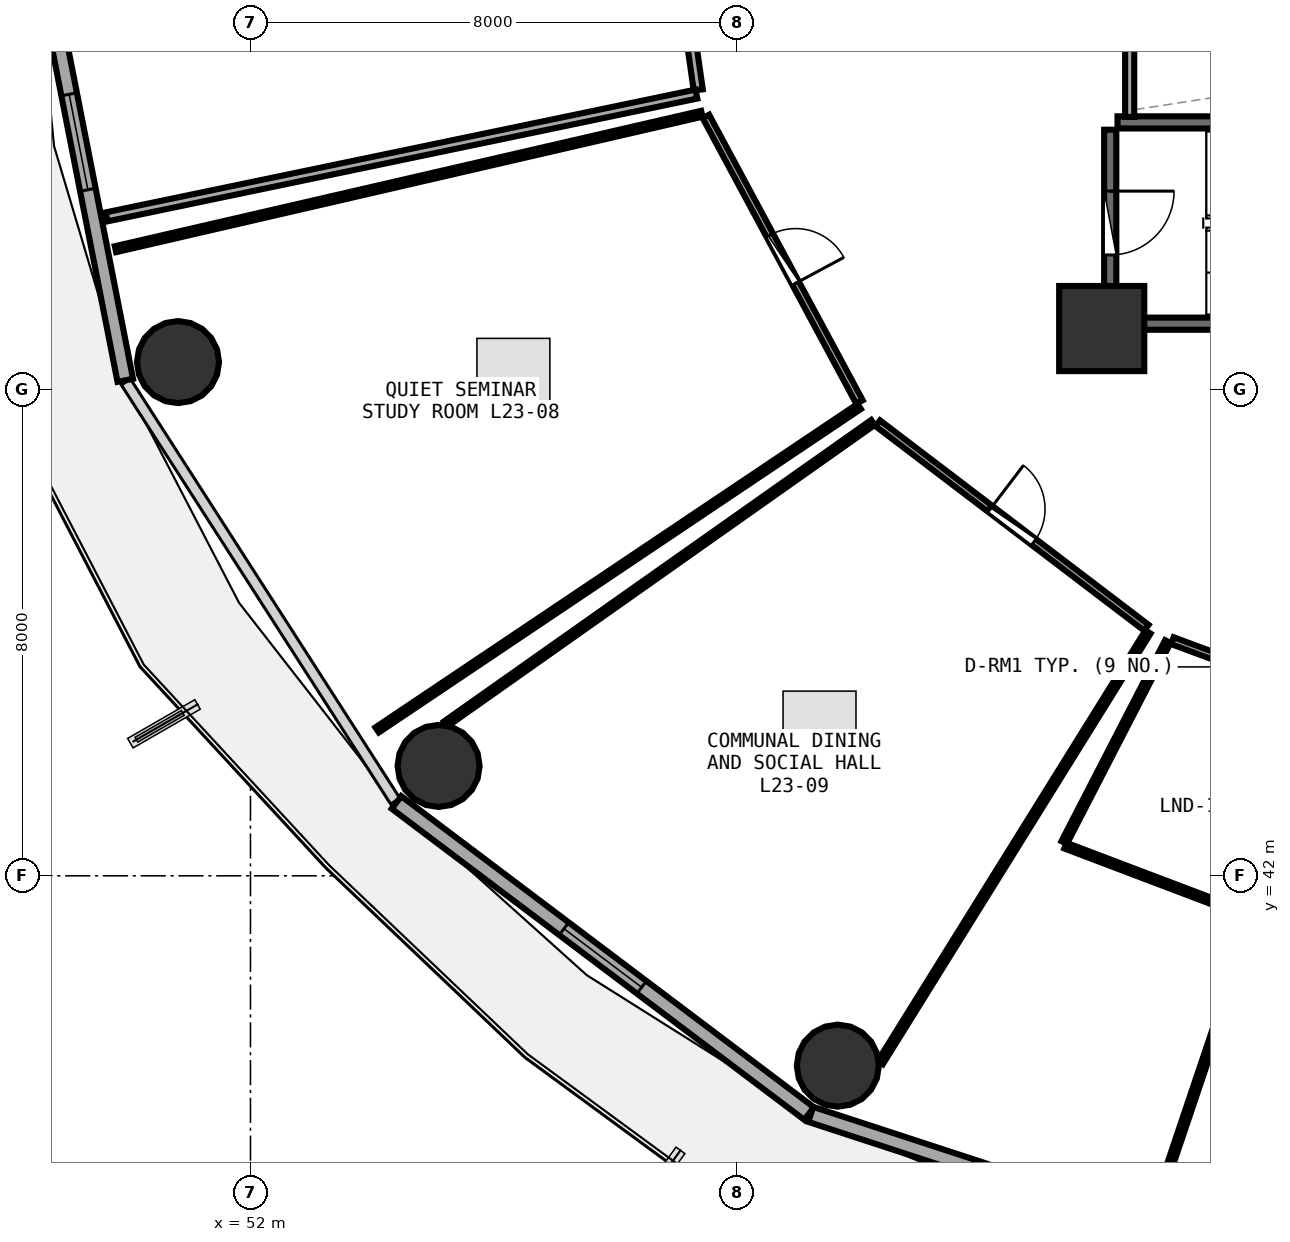
"""IFC4 building model, lengths in metres.
Left out: names, types, materials, properties, quantities, classifications, styles, units other than length and angle.
Written with IfcOpenShell. Run it as: python <this file> out.ifc"""

import sys

from ifc_helpers import new_model, si_unit, direction, frame, frame_2d, origin, origin_2d, place, context, subcontext, project, spatial, rectangle, circle, extrude, element, fill, save


model = new_model("IFC4")
c1 = context("Model", 3, precision=1e-05, world=origin(), true_north=direction((0.0, 1.0)))
c2 = subcontext(c1, "Body", "Model", "MODEL_VIEW")
j1 = project(units=[si_unit("LENGTHUNIT", "METRE"), si_unit("PLANEANGLEUNIT", "RADIAN")], contexts=[c1])
p1 = place(None, origin())
s1 = spatial("IfcSite", under=j1, at=p1, CompositionType="ELEMENT")
p2 = place(p1, origin())
s2 = spatial("IfcBuilding", under=s1, at=p2, CompositionType="ELEMENT")
p3 = place(p2, frame((0.0, 0.0, 91.35)))
s3 = spatial("IfcBuildingStorey", under=s2, at=p3, CompositionType="ELEMENT", Elevation=91.35)
p4 = place(p3, frame((66.0, 51.0, 0.0), z_axis=(0.0, 0.0, 1.0), x_axis=(1.0, 0.0, 0.0)))
e1 = element("IfcColumn", 1, at=p4, inside=s3, PredefinedType="PILASTER", context=c2, shape_type="SweptSolid", body=[
    extrude(rectangle(XDim=1.4, YDim=1.4, at=origin_2d()), origin(), (0.0, 0.0, 1.0), 3.75),
])
for number, where, z_axis, x_axis in (
    (2, (50.808, 50.448, 0.0), (0.0, 0.0, 1.0), (1.0, 0.0, 0.0)),
    (3, (55.094, 43.807, 0.0), (0.0, 0.0, 1.0), (1.0, 0.0, 0.0)),
    (4, (61.66, 38.878, 0.0), (0.0, 0.0, 1.0), (1.0, 0.0, 0.0)),
):
    element("IfcColumn", number, at=place(p3, frame(where, z_axis=z_axis, x_axis=x_axis)), inside=s3, PredefinedType="COLUMN", context=c2, shape_type="SweptSolid", body=[
        extrude(circle(Radius=0.675, at=origin_2d()), origin(), (0.0, 0.0, 1.0), 3.75),
    ])
p5 = place(p3, frame((48.403, 57.985, 0.0), z_axis=(0.0, 0.0, 1.0), x_axis=(0.192581843632, -0.981280914674, 0.0)))
e5 = element("IfcWall", 5, at=p5, inside=s3, PredefinedType="SOLIDWALL", context=c2, shape_type="SweptSolid", body=[
    extrude(rectangle(XDim=7.987, YDim=0.26, at=frame_2d((3.993, 0.0))), origin(), (0.0, 0.0, 1.0), 3.475),
])
p6 = place(p5, frame((3.193, 0.0, 0.85)))
e6 = element("IfcOpeningElement", 6, at=p6, cuts=e5, PredefinedType="OPENING", context=c2, shape_type="SweptSolid", body=[
    extrude(rectangle(XDim=1.6, YDim=1.45, at=frame_2d((0.8, 0.725))), frame((0.0, 0.14, 0.0), z_axis=(0.0, -1.0, 0.0), x_axis=(1.0, 0.0, 0.0)), (0.0, 0.0, 1.0), 0.28),
])
p7 = place(p3, frame((54.401, 43.207, 0.0), z_axis=(0.0, 0.0, 1.0), x_axis=(0.798501507879, -0.601992808857, 0.0)))
e7 = element("IfcWall", 7, at=p7, inside=s3, PredefinedType="SOLIDWALL", context=c2, shape_type="SweptSolid", body=[
    extrude(rectangle(XDim=8.499, YDim=0.26, at=frame_2d((4.25, 0.0))), origin(), (0.0, 0.0, 1.0), 3.475),
])
p8 = place(p7, frame((3.45, 0.0, 0.85)))
e8 = element("IfcOpeningElement", 8, at=p8, cuts=e7, PredefinedType="OPENING", context=c2, shape_type="SweptSolid", body=[
    extrude(rectangle(XDim=1.6, YDim=1.45, at=frame_2d((0.8, 0.725))), frame((0.0, 0.14, 0.0), z_axis=(0.0, -1.0, 0.0), x_axis=(1.0, 0.0, 0.0)), (0.0, 0.0, 1.0), 0.28),
])
p9 = place(p3, frame((61.214, 38.077, 0.0), z_axis=(0.0, 0.0, 1.0), x_axis=(0.950471101963, -0.310812941064, 0.0)))
e9 = element("IfcWall", 9, at=p9, inside=s3, PredefinedType="SOLIDWALL", context=c2, shape_type="SweptSolid", body=[
    extrude(rectangle(XDim=8.76, YDim=0.26, at=frame_2d((4.38, 0.0))), origin(), (0.0, 0.0, 1.0), 3.475),
])
p10 = place(p9, frame((3.58, 0.0, 0.85)))
e10 = element("IfcOpeningElement", 10, at=p10, cuts=e9, PredefinedType="OPENING", context=c2, shape_type="SweptSolid", body=[
    extrude(rectangle(XDim=1.6, YDim=1.45, at=frame_2d((0.8, 0.725))), frame((0.0, 0.14, 0.0), z_axis=(0.0, -1.0, 0.0), x_axis=(1.0, 0.0, 0.0)), (0.0, 0.0, 1.0), 0.28),
])
for number, where, z_axis, x_axis in (
    (11, (66.26, 51.08, 0.0), (0.0, 0.0, 1.0), (1.0, 0.0, 0.0)),
    (12, (73.42, 54.39, 0.0), (0.0, 0.0, 1.0), (-1.0, 0.0, 0.0)),
):
    element("IfcWall", number, at=place(p3, frame(where, z_axis=z_axis, x_axis=x_axis)), inside=s3, PredefinedType="SHEAR", context=c2, shape_type="SweptSolid", body=[
        extrude(rectangle(XDim=7.16, YDim=0.2, at=frame_2d((3.58, 0.0))), origin(), (0.0, 0.0, 1.0), 3.49),
    ])
p11 = place(p3, frame((66.14, 54.27, 0.0), z_axis=(0.0, 0.0, 1.0), x_axis=(0.0, -1.0, 0.0)))
e13 = element("IfcWall", 13, at=p11, inside=s3, PredefinedType="SHEAR", context=c2, shape_type="SweptSolid", body=[
    extrude(rectangle(XDim=3.07, YDim=0.2, at=frame_2d((1.535, 0.0))), origin(), (0.0, 0.0, 1.0), 3.49),
])
p12 = place(p11, frame((1.01, 0.0, 0.0)))
e14 = element("IfcOpeningElement", 14, at=p12, cuts=e13, PredefinedType="OPENING", context=c2, shape_type="SweptSolid", body=[
    extrude(rectangle(XDim=1.05, YDim=2.1, at=frame_2d((0.525, 1.05))), frame((0.0, 0.11, 0.0), z_axis=(0.0, -1.0, 0.0), x_axis=(1.0, 0.0, 0.0)), (0.0, 0.0, 1.0), 0.22),
])
p13 = place(p3, frame((66.46, 54.48, 0.0), z_axis=(0.0, 0.0, 1.0), x_axis=(0.0, 1.0, 0.0)))
e15 = element("IfcWall", 15, at=p13, inside=s3, PredefinedType="PARTITIONING", context=c2, shape_type="SweptSolid", body=[
    extrude(rectangle(XDim=2.29, YDim=0.15, at=frame_2d((1.145, 0.0))), origin(), (0.0, 0.0, 1.0), 3.48),
])
p14 = place(p3, frame((58.983, 57.586, 0.0), z_axis=(0.0, 0.0, 1.0), x_axis=(0.141700939895, -0.989909512851, 0.0)))
e16 = element("IfcWall", 16, at=p14, inside=s3, PredefinedType="PARTITIONING", context=c2, shape_type="SweptSolid", body=[
    extrude(rectangle(XDim=2.689, YDim=0.15, at=frame_2d((1.345, 0.0))), origin(), (0.0, 0.0, 1.0), 3.48),
])
p15 = place(p14, frame((0.87, 0.0, 0.0)))
e17 = element("IfcOpeningElement", 17, at=p15, cuts=e16, PredefinedType="OPENING", context=c2, shape_type="SweptSolid", body=[
    extrude(rectangle(XDim=0.95, YDim=2.08, at=frame_2d((0.475, 1.04))), frame((0.0, 0.085, 0.0), z_axis=(0.0, -1.0, 0.0), x_axis=(1.0, 0.0, 0.0)), (0.0, 0.0, 1.0), 0.17),
])
p16 = place(p3, frame((59.49, 54.488, 0.0), z_axis=(0.0, 0.0, 1.0), x_axis=(0.473630069111, -0.880723882743, 0.0)))
e18 = element("IfcWall", 18, at=p16, inside=s3, PredefinedType="PARTITIONING", context=c2, shape_type="SweptSolid", body=[
    extrude(rectangle(XDim=5.332, YDim=0.12, at=frame_2d((2.666, 0.0))), origin(), (0.0, 0.0, 1.0), 2.925),
])
p17 = place(p16, frame((2.216, 0.0, 0.0)))
e19 = element("IfcOpeningElement", 19, at=p17, cuts=e18, PredefinedType="OPENING", context=c2, shape_type="SweptSolid", body=[
    extrude(rectangle(XDim=0.9, YDim=2.08, at=frame_2d((0.45, 1.04))), frame((0.0, 0.07, 0.0), z_axis=(0.0, -1.0, 0.0), x_axis=(1.0, 0.0, 0.0)), (0.0, 0.0, 1.0), 0.14),
])
p18 = place(p3, frame((62.318, 49.442, 0.0), z_axis=(0.0, 0.0, 1.0), x_axis=(0.795762794985, -0.605608432997, 0.0)))
e20 = element("IfcWall", 20, at=p18, inside=s3, PredefinedType="PARTITIONING", context=c2, shape_type="SweptSolid", body=[
    extrude(rectangle(XDim=5.55, YDim=0.12, at=frame_2d((2.775, 0.0))), origin(), (0.0, 0.0, 1.0), 2.925),
])
p19 = place(p18, frame((2.325, 0.0, 0.0)))
e21 = element("IfcOpeningElement", 21, at=p19, cuts=e20, PredefinedType="OPENING", context=c2, shape_type="SweptSolid", body=[
    extrude(rectangle(XDim=0.9, YDim=2.08, at=frame_2d((0.45, 1.04))), frame((0.0, 0.07, 0.0), z_axis=(0.0, -1.0, 0.0), x_axis=(1.0, 0.0, 0.0)), (0.0, 0.0, 1.0), 0.14),
])
p20 = place(p3, frame((67.162, 45.867, 0.0), z_axis=(0.0, 0.0, 1.0), x_axis=(0.937401389833, -0.348250821018, 0.0)))
e22 = element("IfcWall", 22, at=p20, inside=s3, PredefinedType="PARTITIONING", context=c2, shape_type="SweptSolid", body=[
    extrude(rectangle(XDim=2.479, YDim=0.12, at=frame_2d((1.24, 0.0))), origin(), (0.0, 0.0, 1.0), 2.925),
])
p21 = place(p20, frame((0.789, 0.0, 0.0)))
e23 = element("IfcOpeningElement", 23, at=p21, cuts=e22, PredefinedType="OPENING", context=c2, shape_type="SweptSolid", body=[
    extrude(rectangle(XDim=0.9, YDim=2.08, at=frame_2d((0.45, 1.04))), frame((0.0, 0.07, 0.0), z_axis=(0.0, -1.0, 0.0), x_axis=(1.0, 0.0, 0.0)), (0.0, 0.0, 1.0), 0.14),
])
p22 = place(p3, frame((59.334, 54.856, 0.0), z_axis=(0.0, 0.0, 1.0), x_axis=(-0.979013610983, -0.203794871157, 0.0)))
e24 = element("IfcWall", 24, at=p22, inside=s3, PredefinedType="PARTITIONING", context=c2, shape_type="SweptSolid", body=[
    extrude(rectangle(XDim=9.91, YDim=0.15, at=frame_2d((4.955, 0.0))), origin(), (0.0, 0.0, 1.0), 2.975),
])
p23 = place(p3, frame((62.011, 49.718, 0.0), z_axis=(0.0, 0.0, 1.0), x_axis=(-0.830433607217, -0.557117603388, 0.0)))
e25 = element("IfcWall", 25, at=p23, inside=s3, PredefinedType="PARTITIONING", context=c2, shape_type="SweptSolid", body=[
    extrude(rectangle(XDim=9.546, YDim=0.1, at=frame_2d((4.773, 0.0))), origin(), (0.0, 0.0, 1.0), 2.975),
])
p24 = place(p3, frame((49.78, 52.305, 0.0), z_axis=(0.0, 0.0, 1.0), x_axis=(0.9743529317, 0.225025252999, 0.0)))
e26 = element("IfcWall", 26, at=p24, inside=s3, PredefinedType="PARTITIONING", context=c2, shape_type="SweptSolid", body=[
    extrude(rectangle(XDim=9.897, YDim=0.1, at=frame_2d((4.948, 0.0))), origin(), (0.0, 0.0, 1.0), 2.975),
])
p25 = place(p3, frame((66.761, 46.01, 0.0), z_axis=(0.0, 0.0, 1.0), x_axis=(-0.528015738644, -0.849234584638, 0.0)))
e27 = element("IfcWall", 27, at=p25, inside=s3, PredefinedType="PARTITIONING", context=c2, shape_type="SweptSolid", body=[
    extrude(rectangle(XDim=8.338, YDim=0.1, at=frame_2d((4.169, 0.0))), origin(), (0.0, 0.0, 1.0), 3.175),
])
p26 = place(p3, frame((55.21, 44.498, 0.0), z_axis=(0.0, 0.0, 1.0), x_axis=(0.817133838915, 0.576447993578, 0.0)))
e28 = element("IfcWall", 28, at=p26, inside=s3, PredefinedType="PARTITIONING", context=c2, shape_type="SweptSolid", body=[
    extrude(rectangle(XDim=8.6, YDim=0.1, at=frame_2d((4.3, 0.0))), origin(), (0.0, 0.0, 1.0), 3.175),
])
p27 = place(p3, frame((68.378, 41.368, 0.0), z_axis=(0.0, 0.0, 1.0), x_axis=(-0.935027341219, 0.354575621233, 0.0)))
e29 = element("IfcWall", 29, at=p27, inside=s3, PredefinedType="PARTITIONING", context=c2, shape_type="SweptSolid", body=[
    extrude(rectangle(XDim=3.183, YDim=0.1, at=frame_2d((1.592, 0.0))), origin(), (0.0, 0.0, 1.0), 2.925),
])
p28 = place(p3, frame((65.382, 42.546, 0.0), z_axis=(0.0, 0.0, 1.0), x_axis=(0.458413879464, 0.888738834031, 0.0)))
e30 = element("IfcWall", 30, at=p28, inside=s3, PredefinedType="PARTITIONING", context=c2, shape_type="SweptSolid", body=[
    extrude(rectangle(XDim=3.72, YDim=0.1, at=frame_2d((1.86, 0.0))), origin(), (0.0, 0.0, 1.0), 3.175),
])
p29 = place(p3, frame((66.867, 36.49, 0.0), z_axis=(0.0, 0.0, 1.0), x_axis=(0.319911741109, 0.947447348353, 0.0)))
e31 = element("IfcWall", 31, at=p29, inside=s3, PredefinedType="PARTITIONING", context=c2, shape_type="SweptSolid", body=[
    extrude(rectangle(XDim=5.146, YDim=0.1, at=frame_2d((2.573, 0.0))), origin(), (0.0, 0.0, 1.0), 2.925),
])
p30 = place(p6, origin())
e32 = element("IfcWindow", 32, at=p30, inside=s3, PartitioningType="SINGLE_PANEL", PredefinedType="WINDOW", context=c2, shape_type="SweptSolid", body=[
    extrude(rectangle(XDim=1.6, YDim=1.45, at=frame_2d((0.8, 0.725))), frame((0.0, 0.03, 0.0), z_axis=(0.0, -1.0, 0.0), x_axis=(1.0, 0.0, 0.0)), (0.0, 0.0, 1.0), 0.06),
])
fill(e6, e32)
p31 = place(p8, origin())
e33 = element("IfcWindow", 33, at=p31, inside=s3, PartitioningType="SINGLE_PANEL", PredefinedType="WINDOW", context=c2, shape_type="SweptSolid", body=[
    extrude(rectangle(XDim=1.6, YDim=1.45, at=frame_2d((0.8, 0.725))), frame((0.0, 0.03, 0.0), z_axis=(0.0, -1.0, 0.0), x_axis=(1.0, 0.0, 0.0)), (0.0, 0.0, 1.0), 0.06),
])
fill(e8, e33)
p32 = place(p12, origin())
e34 = element("IfcDoor", 34, at=p32, inside=s3, OperationType="SINGLE_SWING_LEFT", PredefinedType="DOOR", context=c2, shape_type="SweptSolid", body=[
    extrude(rectangle(XDim=1.05, YDim=2.1, at=frame_2d((0.525, 1.05))), frame((0.0, 0.025, 0.0), z_axis=(0.0, -1.0, 0.0), x_axis=(1.0, 0.0, 0.0)), (0.0, 0.0, 1.0), 0.05),
])
fill(e14, e34)
p33 = place(p17, origin())
e35 = element("IfcDoor", 35, at=p33, inside=s3, OperationType="SINGLE_SWING_RIGHT", PredefinedType="DOOR", context=c2, shape_type="SweptSolid", body=[
    extrude(rectangle(XDim=0.9, YDim=2.08, at=frame_2d((0.45, 1.04))), frame((0.0, 0.025, 0.0), z_axis=(0.0, -1.0, 0.0), x_axis=(1.0, 0.0, 0.0)), (0.0, 0.0, 1.0), 0.05),
])
fill(e19, e35)
p34 = place(p19, origin())
e36 = element("IfcDoor", 36, at=p34, inside=s3, OperationType="SINGLE_SWING_LEFT", PredefinedType="DOOR", context=c2, shape_type="SweptSolid", body=[
    extrude(rectangle(XDim=0.9, YDim=2.08, at=frame_2d((0.45, 1.04))), frame((0.0, 0.025, 0.0), z_axis=(0.0, -1.0, 0.0), x_axis=(1.0, 0.0, 0.0)), (0.0, 0.0, 1.0), 0.05),
])
fill(e21, e36)
save(model, sys.argv[1])
